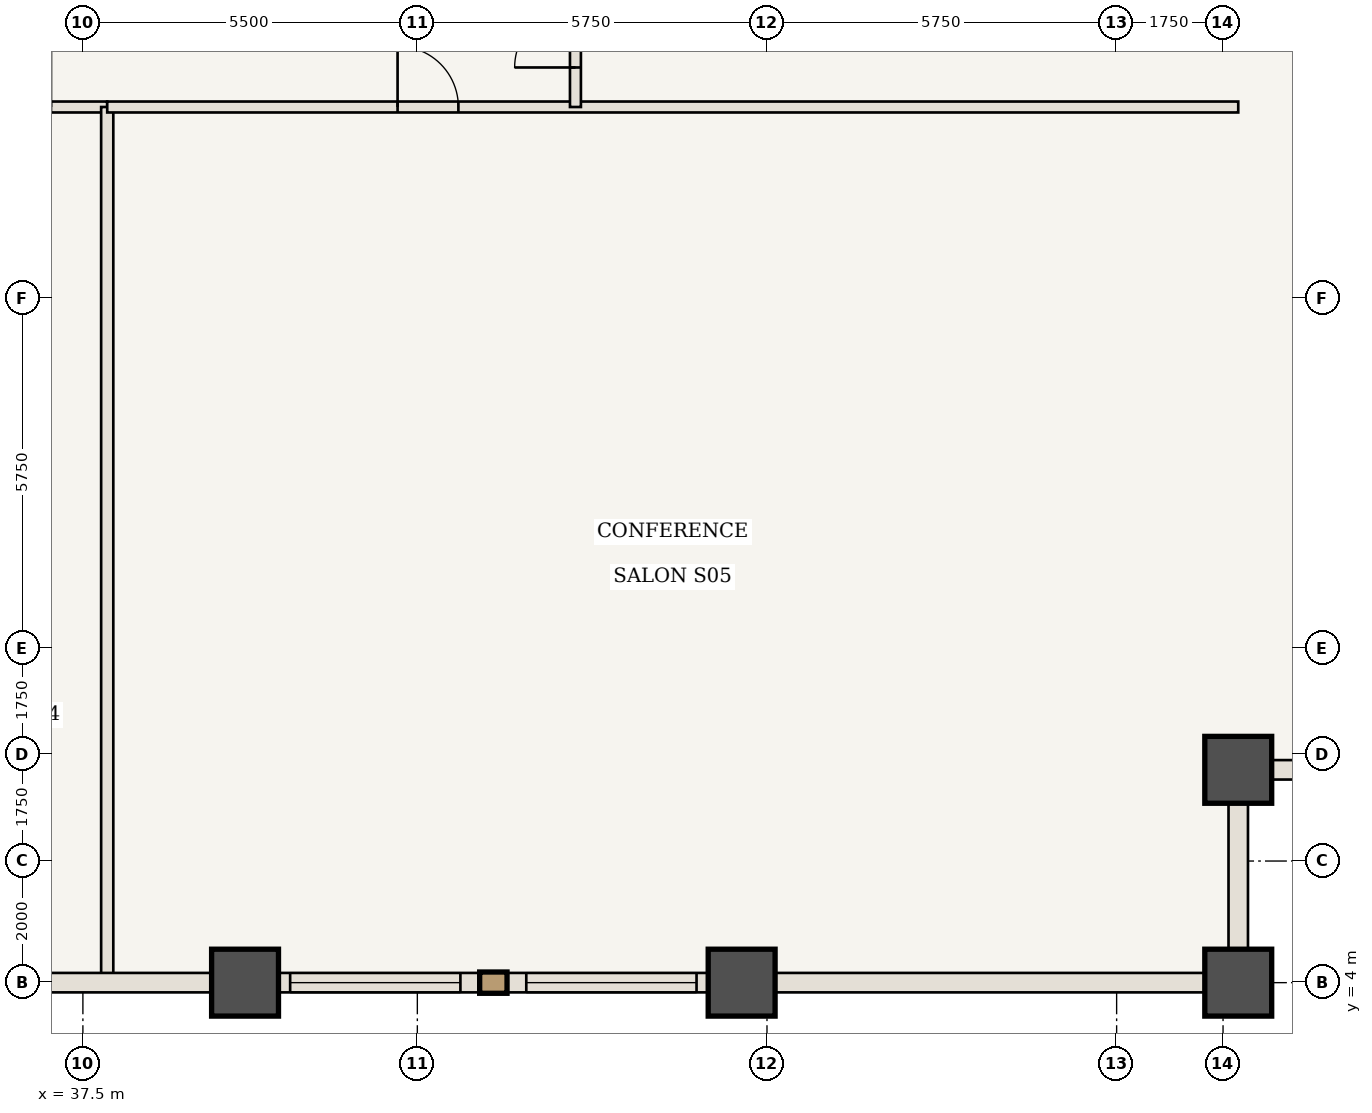
"""IFC4 building model, lengths in metres.
Left out: names, types, materials, properties, quantities, classifications, styles, units other than length and angle.
Written with IfcOpenShell. Run it as: python <this file> out.ifc"""

import sys

from ifc_helpers import new_model, si_unit, direction, frame, frame_2d, origin, origin_2d, place, context, subcontext, project, spatial, rectangle, extrude, element, fill, save


model = new_model("IFC4")
c1 = context("Model", 3, precision=1e-05, world=origin(), true_north=direction((0.0, 1.0)))
c2 = subcontext(c1, "Body", "Model", "MODEL_VIEW")
j1 = project(units=[si_unit("LENGTHUNIT", "METRE"), si_unit("PLANEANGLEUNIT", "RADIAN")], contexts=[c1])
p1 = place(None, origin())
s1 = spatial("IfcSite", under=j1, at=p1, CompositionType="ELEMENT")
p2 = place(p1, origin())
s2 = spatial("IfcBuilding", under=s1, at=p2, CompositionType="ELEMENT")
p3 = place(p2, frame((0.0, 0.0, 45.85)))
s3 = spatial("IfcBuildingStorey", under=s2, at=p3, CompositionType="ELEMENT", Elevation=45.85)
for number, where, z_axis, x_axis in (
    (1, (56.5, 4.0, 0.0), (0.0, 0.0, 1.0), (1.0, 0.0, 0.0)),
    (2, (56.5, 7.5, 0.0), (0.0, 0.0, 1.0), (1.0, 0.0, 0.0)),
    (3, (40.167, 4.0, 0.0), (0.0, 0.0, 1.0), (1.0, 0.0, 0.0)),
    (4, (48.333, 4.0, 0.0), (0.0, 0.0, 1.0), (1.0, 0.0, 0.0)),
):
    element("IfcColumn", number, at=place(p3, frame(where, z_axis=z_axis, x_axis=x_axis)), inside=s3, PredefinedType="COLUMN", context=c2, shape_type="SweptSolid", body=[
        extrude(rectangle(XDim=1.1, YDim=1.1, at=origin_2d()), origin(), (0.0, 0.0, 1.0), 3.5),
    ])
p4 = place(p3, frame((33.2, 18.4, 0.0), z_axis=(0.0, 0.0, 1.0), x_axis=(1.0, 0.0, 0.0)))
e5 = element("IfcWall", 5, at=p4, inside=s3, PredefinedType="STANDARD", context=c2, shape_type="SweptSolid", body=[
    extrude(rectangle(XDim=4.7, YDim=0.18, at=frame_2d((2.35, 0.0))), origin(), (0.0, 0.0, 1.0), 3.32),
])
p5 = place(p4, frame((2.775, 0.0, 0.0)))
e6 = element("IfcOpeningElement", 6, at=p5, cuts=e5, PredefinedType="OPENING", context=c2, shape_type="SweptSolid", body=[
    extrude(rectangle(XDim=1.0, YDim=2.15, at=frame_2d((0.5, 1.075))), frame((0.0, 0.1, 0.0), z_axis=(0.0, -1.0, 0.0), x_axis=(1.0, 0.0, 0.0)), (0.0, 0.0, 1.0), 0.2),
])
p6 = place(p3, frame((37.9, 4.06, 0.0), z_axis=(0.0, 0.0, 1.0), x_axis=(0.0, 1.0, 0.0)))
e7 = element("IfcWall", 7, at=p6, inside=s3, PredefinedType="STANDARD", context=c2, shape_type="SweptSolid", body=[
    extrude(rectangle(XDim=14.34, YDim=0.2, at=frame_2d((7.17, 0.0))), origin(), (0.0, 0.0, 1.0), 3.32),
])
p7 = place(p3, frame((37.9, 18.4, 0.0), z_axis=(0.0, 0.0, 1.0), x_axis=(1.0, 0.0, 0.0)))
e8 = element("IfcWall", 8, at=p7, inside=s3, PredefinedType="STANDARD", context=c2, shape_type="SweptSolid", body=[
    extrude(rectangle(XDim=18.6, YDim=0.18, at=frame_2d((9.3, 0.0))), origin(), (0.0, 0.0, 1.0), 3.32),
])
p8 = place(p7, frame((4.775, 0.0, 0.0)))
e9 = element("IfcOpeningElement", 9, at=p8, cuts=e8, PredefinedType="OPENING", context=c2, shape_type="SweptSolid", body=[
    extrude(rectangle(XDim=1.0, YDim=2.15, at=frame_2d((0.5, 1.075))), frame((0.0, 0.1, 0.0), z_axis=(0.0, -1.0, 0.0), x_axis=(1.0, 0.0, 0.0)), (0.0, 0.0, 1.0), 0.2),
])
p9 = place(p3, frame((45.6, 18.4, 0.0), z_axis=(0.0, 0.0, 1.0), x_axis=(0.0, 1.0, 0.0)))
e10 = element("IfcWall", 10, at=p9, inside=s3, PredefinedType="STANDARD", context=c2, shape_type="SweptSolid", body=[
    extrude(rectangle(XDim=5.2, YDim=0.18, at=frame_2d((2.6, 0.0))), origin(), (0.0, 0.0, 1.0), 3.32),
])
p10 = place(p9, frame((0.65, 0.0, 0.0)))
e11 = element("IfcOpeningElement", 11, at=p10, cuts=e10, PredefinedType="OPENING", context=c2, shape_type="SweptSolid", body=[
    extrude(rectangle(XDim=1.0, YDim=2.15, at=frame_2d((0.5, 1.075))), frame((0.0, 0.1, 0.0), z_axis=(0.0, -1.0, 0.0), x_axis=(1.0, 0.0, 0.0)), (0.0, 0.0, 1.0), 0.2),
])
p11 = place(p3, frame((40.167, 4.0, 0.0), z_axis=(0.0, 0.0, 1.0), x_axis=(-1.0, 0.0, 0.0)))
e12 = element("IfcWall", 12, at=p11, inside=s3, PredefinedType="USERDEFINED", context=c2, shape_type="SweptSolid", body=[
    extrude(rectangle(XDim=8.167, YDim=0.32, at=frame_2d((4.083, 0.0))), origin(), (0.0, 0.0, 1.0), 2.52),
])
p12 = place(p11, frame((3.417, 0.0, 0.85)))
e13 = element("IfcOpeningElement", 13, at=p12, cuts=e12, PredefinedType="OPENING", context=c2, shape_type="SweptSolid", body=[
    extrude(rectangle(XDim=2.4, YDim=1.47, at=frame_2d((1.2, 0.735))), frame((0.0, 0.17, 0.0), z_axis=(0.0, -1.0, 0.0), x_axis=(1.0, 0.0, 0.0)), (0.0, 0.0, 1.0), 0.34),
])
p13 = place(p3, frame((48.333, 4.0, 0.0), z_axis=(0.0, 0.0, 1.0), x_axis=(-1.0, 0.0, 0.0)))
e14 = element("IfcWall", 14, at=p13, inside=s3, PredefinedType="USERDEFINED", context=c2, shape_type="SweptSolid", body=[
    extrude(rectangle(XDim=8.167, YDim=0.32, at=frame_2d((4.083, 0.0))), origin(), (0.0, 0.0, 1.0), 2.52),
])
p14 = place(p13, frame((0.742, 0.0, 0.85)))
e15 = element("IfcOpeningElement", 15, at=p14, cuts=e14, PredefinedType="OPENING", context=c2, shape_type="SweptSolid", body=[
    extrude(rectangle(XDim=2.8, YDim=1.47, at=frame_2d((1.4, 0.735))), frame((0.0, 0.17, 0.0), z_axis=(0.0, -1.0, 0.0), x_axis=(1.0, 0.0, 0.0)), (0.0, 0.0, 1.0), 0.34),
])
p15 = place(p13, frame((4.625, 0.0, 0.85)))
e16 = element("IfcOpeningElement", 16, at=p15, cuts=e14, PredefinedType="OPENING", context=c2, shape_type="SweptSolid", body=[
    extrude(rectangle(XDim=2.8, YDim=1.47, at=frame_2d((1.4, 0.735))), frame((0.0, 0.17, 0.0), z_axis=(0.0, -1.0, 0.0), x_axis=(1.0, 0.0, 0.0)), (0.0, 0.0, 1.0), 0.34),
])
p16 = place(p3, frame((56.5, 4.0, 0.0), z_axis=(0.0, 0.0, 1.0), x_axis=(-1.0, 0.0, 0.0)))
e17 = element("IfcWall", 17, at=p16, inside=s3, PredefinedType="USERDEFINED", context=c2, shape_type="SweptSolid", body=[
    extrude(rectangle(XDim=8.167, YDim=0.32, at=frame_2d((4.083, 0.0))), origin(), (0.0, 0.0, 1.0), 2.52),
])
for number, where, z_axis, x_axis in (
    (18, (56.5, 7.5, 0.0), (0.0, 0.0, 1.0), (0.0, -1.0, 0.0)),
    (19, (60.0, 7.5, 0.0), (0.0, 0.0, 1.0), (-1.0, 0.0, 0.0)),
):
    element("IfcWall", number, at=place(p3, frame(where, z_axis=z_axis, x_axis=x_axis)), inside=s3, PredefinedType="USERDEFINED", context=c2, shape_type="SweptSolid", body=[
        extrude(rectangle(XDim=3.5, YDim=0.32, at=frame_2d((1.75, 0.0))), origin(), (0.0, 0.0, 1.0), 2.52),
    ])
p17 = place(p8, origin())
e20 = element("IfcDoor", 20, at=p17, inside=s3, OperationType="SINGLE_SWING_LEFT", PredefinedType="DOOR", context=c2, shape_type="SweptSolid", body=[
    extrude(rectangle(XDim=1.0, YDim=2.15, at=frame_2d((0.5, 1.075))), frame((0.0, 0.025, 0.0), z_axis=(0.0, -1.0, 0.0), x_axis=(1.0, 0.0, 0.0)), (0.0, 0.0, 1.0), 0.05),
])
fill(e9, e20)
p18 = place(p10, origin())
e21 = element("IfcDoor", 21, at=p18, inside=s3, OperationType="SINGLE_SWING_LEFT", PredefinedType="DOOR", context=c2, shape_type="SweptSolid", body=[
    extrude(rectangle(XDim=1.0, YDim=2.15, at=frame_2d((0.5, 1.075))), frame((0.0, 0.025, 0.0), z_axis=(0.0, -1.0, 0.0), x_axis=(1.0, 0.0, 0.0)), (0.0, 0.0, 1.0), 0.05),
])
fill(e11, e21)
p19 = place(p14, origin())
e22 = element("IfcWindow", 22, at=p19, inside=s3, PartitioningType="SINGLE_PANEL", PredefinedType="WINDOW", context=c2, shape_type="SweptSolid", body=[
    extrude(rectangle(XDim=2.8, YDim=1.47, at=frame_2d((1.4, 0.735))), frame((0.0, 0.03, 0.0), z_axis=(0.0, -1.0, 0.0), x_axis=(1.0, 0.0, 0.0)), (0.0, 0.0, 1.0), 0.06),
])
fill(e15, e22)
p20 = place(p15, origin())
e23 = element("IfcWindow", 23, at=p20, inside=s3, PartitioningType="SINGLE_PANEL", PredefinedType="WINDOW", context=c2, shape_type="SweptSolid", body=[
    extrude(rectangle(XDim=2.8, YDim=1.47, at=frame_2d((1.4, 0.735))), frame((0.0, 0.03, 0.0), z_axis=(0.0, -1.0, 0.0), x_axis=(1.0, 0.0, 0.0)), (0.0, 0.0, 1.0), 0.06),
])
fill(e16, e23)
save(model, sys.argv[1])
